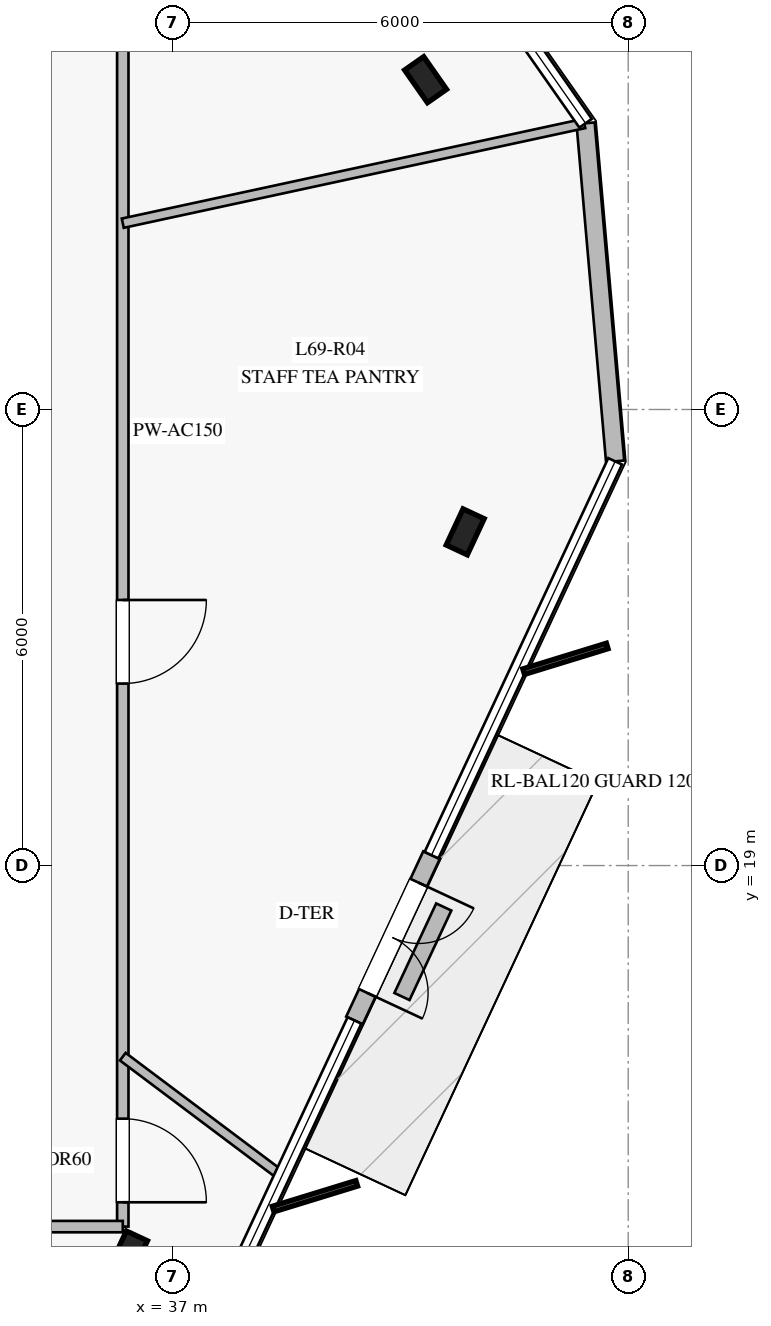
"""IFC4 building model, lengths in metres.
Left out: names, types, materials, properties, quantities, classifications, styles, units other than length and angle.
Written with IfcOpenShell. Run it as: python <this file> out.ifc"""

import sys

from ifc_helpers import new_model, si_unit, direction, frame, frame_2d, origin, origin_2d, place, context, subcontext, project, spatial, rectangle, i_section, extrude, element, fill, save


model = new_model("IFC4")
c1 = context("Model", 3, precision=1e-05, world=origin(), true_north=direction((0.0, 1.0)))
c2 = subcontext(c1, "Body", "Model", "MODEL_VIEW")
j1 = project(units=[si_unit("LENGTHUNIT", "METRE"), si_unit("PLANEANGLEUNIT", "RADIAN")], contexts=[c1])
p1 = place(None, origin())
s1 = spatial("IfcSite", under=j1, at=p1, CompositionType="ELEMENT")
p2 = place(p1, origin())
s2 = spatial("IfcBuilding", under=s1, at=p2, CompositionType="ELEMENT")
p3 = place(p2, frame((0.0, 0.0, 286.2)))
s3 = spatial("IfcBuildingStorey", under=s2, at=p3, CompositionType="ELEMENT", Elevation=286.2)
for number, where, z_axis, x_axis in (
    (1, (36.425, 13.89, 0.0), (0.0, 0.0, 1.0), (0.423, 0.906, 0.0)),
    (2, (40.855, 23.39, 0.0), (0.0, 0.0, 1.0), (0.423, 0.906, 0.0)),
    (3, (40.334, 29.339, 0.0), (0.0, 0.0, 1.0), (-0.574, 0.819, 0.0)),
):
    element("IfcColumn", number, at=place(p3, frame(where, z_axis=z_axis, x_axis=x_axis)), inside=s3, PredefinedType="COLUMN", context=c2, shape_type="SweptSolid", body=[
        extrude(i_section(OverallWidth=0.306, OverallDepth=0.524, WebThickness=0.021, FlangeThickness=0.04, at=origin_2d()), origin(), (0.0, 0.0, 1.0), 4.0),
    ])
p4 = place(p3, frame((39.398, 16.962, 0.0), z_axis=(0.0, 0.0, 1.0), x_axis=(0.422590274694, 0.906320837085, 0.0)))
e4 = element("IfcWall", 4, at=p4, inside=s3, PredefinedType="STANDARD", context=c2, shape_type="SweptSolid", body=[
    extrude(rectangle(XDim=2.4, YDim=0.24, at=frame_2d((1.2, 0.0))), origin(), (0.0, 0.0, 1.0), 3.78),
])
p5 = place(p4, frame((0.4, 0.0, 0.0)))
e5 = element("IfcOpeningElement", 5, at=p5, cuts=e4, PredefinedType="OPENING", context=c2, shape_type="SweptSolid", body=[
    extrude(rectangle(XDim=1.6, YDim=2.25, at=frame_2d((0.8, 1.125))), frame((0.0, 0.13, 0.0), z_axis=(0.0, -1.0, 0.0), x_axis=(1.0, 0.0, 0.0)), (0.0, 0.0, 1.0), 0.26),
])
p6 = place(p3, frame((42.828, 24.318, 0.0), z_axis=(0.0, 0.0, 1.0), x_axis=(-0.087103868575, 0.996199235133, 0.0)))
e6 = element("IfcWall", 6, at=p6, inside=s3, PredefinedType="STANDARD", context=c2, shape_type="SweptSolid", body=[
    extrude(rectangle(XDim=4.465, YDim=0.24, at=frame_2d((2.232, 0.0))), origin(), (0.0, 0.0, 1.0), 3.78),
])
p7 = place(p3, frame((40.023, 17.277, 0.0), z_axis=(0.0, 0.0, 1.0), x_axis=(0.423091064029, 0.90608716553, 0.0)))
e7 = element("IfcWall", 7, at=p7, inside=s3, PredefinedType="USERDEFINED", context=c2, shape_type="SweptSolid", body=[
    extrude(rectangle(XDim=1.3, YDim=0.22, at=frame_2d((0.65, 0.0))), origin(), (0.0, 0.0, 1.0), 0.4),
])
p8 = place(p3, frame((36.35, 35.75, 0.0), z_axis=(0.0, 0.0, 1.0), x_axis=(0.0, -1.0, 0.0)))
e8 = element("IfcWall", 8, at=p8, inside=s3, PredefinedType="PARTITIONING", context=c2, shape_type="SweptSolid", body=[
    extrude(rectangle(XDim=21.5, YDim=0.15, at=frame_2d((10.75, 0.0))), origin(), (0.0, 0.0, 1.0), 3.02),
])
p9 = place(p8, frame((20.08, 0.0, 0.0)))
e9 = element("IfcOpeningElement", 9, at=p9, cuts=e8, PredefinedType="OPENING", context=c2, shape_type="SweptSolid", body=[
    extrude(rectangle(XDim=1.1, YDim=2.2, at=frame_2d((0.55, 1.1))), frame((0.0, 0.085, 0.0), z_axis=(0.0, -1.0, 0.0), x_axis=(1.0, 0.0, 0.0)), (0.0, 0.0, 1.0), 0.17),
])
p10 = place(p8, frame((13.256, 0.0, 0.0)))
e10 = element("IfcOpeningElement", 10, at=p10, cuts=e8, PredefinedType="OPENING", context=c2, shape_type="SweptSolid", body=[
    extrude(rectangle(XDim=1.1, YDim=2.2, at=frame_2d((0.55, 1.1))), frame((0.0, 0.085, 0.0), z_axis=(0.0, -1.0, 0.0), x_axis=(1.0, 0.0, 0.0)), (0.0, 0.0, 1.0), 0.17),
])
p11 = place(p3, frame((36.35, 14.25, 0.0), z_axis=(0.0, 0.0, 1.0), x_axis=(-1.0, 0.0, 0.0)))
e11 = element("IfcWall", 11, at=p11, inside=s3, PredefinedType="PARTITIONING", context=c2, shape_type="SweptSolid", body=[
    extrude(rectangle(XDim=22.7, YDim=0.15, at=frame_2d((11.35, 0.0))), origin(), (0.0, 0.0, 1.0), 3.05),
])
p12 = place(p11, frame((16.944, 0.0, 0.0)))
e12 = element("IfcOpeningElement", 12, at=p12, cuts=e11, PredefinedType="OPENING", context=c2, shape_type="SweptSolid", body=[
    extrude(rectangle(XDim=1.1, YDim=2.2, at=frame_2d((0.55, 1.1))), frame((0.0, 0.085, 0.0), z_axis=(0.0, -1.0, 0.0), x_axis=(1.0, 0.0, 0.0)), (0.0, 0.0, 1.0), 0.17),
])
p13 = place(p3, frame((36.35, 16.486, 0.0), z_axis=(0.0, 0.0, 1.0), x_axis=(0.799785896755, -0.600285364932, 0.0)))
e13 = element("IfcWall", 13, at=p13, inside=s3, PredefinedType="PARTITIONING", context=c2, shape_type="SweptSolid", body=[
    extrude(rectangle(XDim=2.601, YDim=0.125, at=frame_2d((1.3, 0.0))), origin(), (0.0, 0.0, 1.0), 3.28),
])
p14 = place(p3, frame((36.35, 27.451, 0.0), z_axis=(0.0, 0.0, 1.0), x_axis=(0.977442678881, 0.211200874766, 0.0)))
e14 = element("IfcWall", 14, at=p14, inside=s3, PredefinedType="PARTITIONING", context=c2, shape_type="SweptSolid", body=[
    extrude(rectangle(XDim=6.212, YDim=0.125, at=frame_2d((3.106, 0.0))), origin(), (0.0, 0.0, 1.0), 3.28),
])
p15 = place(p5, frame((1.6, 0.0, 0.0), z_axis=(0.0, 0.0, 1.0), x_axis=(-1.0, 0.0, 0.0)))
e15 = element("IfcDoor", 15, at=p15, inside=s3, OperationType="DOUBLE_DOOR_SINGLE_SWING", PredefinedType="DOOR", context=c2, shape_type="SweptSolid", body=[
    extrude(rectangle(XDim=1.6, YDim=2.25, at=frame_2d((0.8, 1.125))), frame((0.0, 0.025, 0.0), z_axis=(0.0, -1.0, 0.0), x_axis=(1.0, 0.0, 0.0)), (0.0, 0.0, 1.0), 0.05),
])
fill(e5, e15)
p16 = place(p9, origin())
e16 = element("IfcDoor", 16, at=p16, inside=s3, OperationType="SINGLE_SWING_RIGHT", PredefinedType="DOOR", context=c2, shape_type="SweptSolid", body=[
    extrude(rectangle(XDim=1.1, YDim=2.2, at=frame_2d((0.55, 1.1))), frame((0.0, 0.025, 0.0), z_axis=(0.0, -1.0, 0.0), x_axis=(1.0, 0.0, 0.0)), (0.0, 0.0, 1.0), 0.05),
])
fill(e9, e16)
p17 = place(p10, origin())
e17 = element("IfcDoor", 17, at=p17, inside=s3, OperationType="SINGLE_SWING_LEFT", PredefinedType="DOOR", context=c2, shape_type="SweptSolid", body=[
    extrude(rectangle(XDim=1.1, YDim=2.2, at=frame_2d((0.55, 1.1))), frame((0.0, 0.025, 0.0), z_axis=(0.0, -1.0, 0.0), x_axis=(1.0, 0.0, 0.0)), (0.0, 0.0, 1.0), 0.05),
])
fill(e10, e17)
save(model, sys.argv[1])
